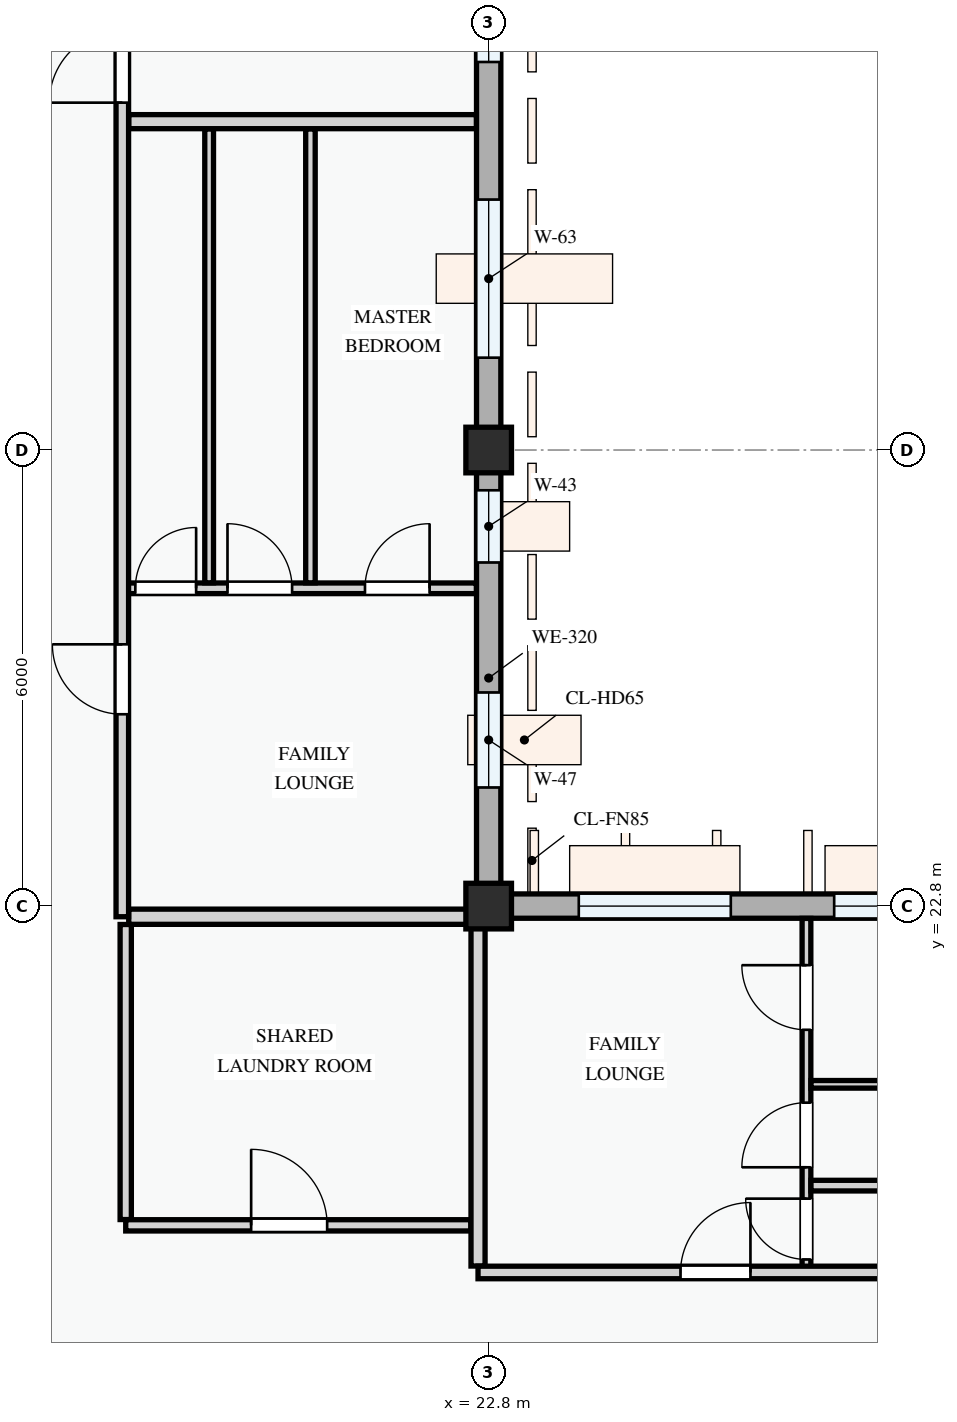
"""IFC4 building model, lengths in metres.
Left out: names, types, materials, properties, quantities, classifications, styles, units other than length and angle.
Written with IfcOpenShell. Run it as: python <this file> out.ifc"""

import sys

from ifc_helpers import new_model, si_unit, direction, frame, frame_2d, origin, origin_2d, place, context, subcontext, project, spatial, rectangle, extrude, element, fill, save


model = new_model("IFC4")
c1 = context("Model", 3, precision=1e-05, world=origin(), true_north=direction((0.0, 1.0)))
c2 = subcontext(c1, "Body", "Model", "MODEL_VIEW")
j1 = project(units=[si_unit("LENGTHUNIT", "METRE"), si_unit("PLANEANGLEUNIT", "RADIAN")], contexts=[c1])
p1 = place(None, origin())
s1 = spatial("IfcSite", under=j1, at=p1, CompositionType="ELEMENT")
p2 = place(p1, origin())
s2 = spatial("IfcBuilding", under=s1, at=p2, CompositionType="ELEMENT")
p3 = place(p2, frame((0.0, 0.0, 14.7)))
s3 = spatial("IfcBuildingStorey", under=s2, at=p3, CompositionType="ELEMENT", Elevation=14.7)
for number, where, z_axis, x_axis in (
    (1, (22.8, 22.8, 0.0), (0.0, 0.0, 1.0), (1.0, 0.0, 0.0)),
    (2, (22.8, 28.8, 0.0), (0.0, 0.0, 1.0), (1.0, 0.0, 0.0)),
):
    element("IfcColumn", number, at=place(p3, frame(where, z_axis=z_axis, x_axis=x_axis)), inside=s3, PredefinedType="COLUMN", context=c2, shape_type="SweptSolid", body=[
        extrude(rectangle(XDim=0.6, YDim=0.6, at=origin_2d()), origin(), (0.0, 0.0, 1.0), 3.3),
    ])
p4 = place(p3, frame((22.8, 22.8, 0.0), z_axis=(0.0, 0.0, 1.0), x_axis=(0.0, 1.0, 0.0)))
e3 = element("IfcWall", 3, at=p4, inside=s3, PredefinedType="STANDARD", context=c2, shape_type="SweptSolid", body=[
    extrude(rectangle(XDim=6.0, YDim=0.32, at=frame_2d((3.0, 0.0))), origin(), (0.0, 0.0, 1.0), 2.575),
])
p5 = place(p4, frame((1.56, 0.0, 0.78)))
e4 = element("IfcOpeningElement", 4, at=p5, cuts=e3, PredefinedType="OPENING", context=c2, shape_type="SweptSolid", body=[
    extrude(rectangle(XDim=1.25, YDim=1.45, at=frame_2d((0.625, 0.725))), frame((0.0, 0.17, 0.0), z_axis=(0.0, -1.0, 0.0), x_axis=(1.0, 0.0, 0.0)), (0.0, 0.0, 1.0), 0.34),
])
p6 = place(p4, frame((4.521, 0.0, 0.78)))
e5 = element("IfcOpeningElement", 5, at=p6, cuts=e3, PredefinedType="OPENING", context=c2, shape_type="SweptSolid", body=[
    extrude(rectangle(XDim=0.95, YDim=1.15, at=frame_2d((0.475, 0.575))), frame((0.0, 0.17, 0.0), z_axis=(0.0, -1.0, 0.0), x_axis=(1.0, 0.0, 0.0)), (0.0, 0.0, 1.0), 0.34),
])
p7 = place(p3, frame((22.8, 28.8, 0.0), z_axis=(0.0, 0.0, 1.0), x_axis=(0.0, 1.0, 0.0)))
e6 = element("IfcWall", 6, at=p7, inside=s3, PredefinedType="STANDARD", context=c2, shape_type="SweptSolid", body=[
    extrude(rectangle(XDim=8.4, YDim=0.32, at=frame_2d((4.2, 0.0))), origin(), (0.0, 0.0, 1.0), 2.425),
])
p8 = place(p7, frame((1.215, 0.0, 0.78)))
e7 = element("IfcOpeningElement", 7, at=p8, cuts=e6, PredefinedType="OPENING", context=c2, shape_type="SweptSolid", body=[
    extrude(rectangle(XDim=2.08, YDim=1.52, at=frame_2d((1.04, 0.76))), frame((0.0, 0.17, 0.0), z_axis=(0.0, -1.0, 0.0), x_axis=(1.0, 0.0, 0.0)), (0.0, 0.0, 1.0), 0.34),
])
p9 = place(p7, frame((5.105, 0.0, 0.78)))
e8 = element("IfcOpeningElement", 8, at=p9, cuts=e6, PredefinedType="OPENING", context=c2, shape_type="SweptSolid", body=[
    extrude(rectangle(XDim=2.32, YDim=1.5, at=frame_2d((1.16, 0.75))), frame((0.0, 0.17, 0.0), z_axis=(0.0, -1.0, 0.0), x_axis=(1.0, 0.0, 0.0)), (0.0, 0.0, 1.0), 0.34),
])
p10 = place(p3, frame((28.8, 22.8, 0.0), z_axis=(0.0, 0.0, 1.0), x_axis=(-1.0, 0.0, 0.0)))
e9 = element("IfcWall", 9, at=p10, inside=s3, PredefinedType="STANDARD", context=c2, shape_type="SweptSolid", body=[
    extrude(rectangle(XDim=6.0, YDim=0.32, at=frame_2d((3.0, 0.0))), origin(), (0.0, 0.0, 1.0), 2.475),
])
p11 = place(p10, frame((0.555, 0.0, 0.78)))
e10 = element("IfcOpeningElement", 10, at=p11, cuts=e9, PredefinedType="OPENING", context=c2, shape_type="SweptSolid", body=[
    extrude(rectangle(XDim=0.9, YDim=1.2, at=frame_2d((0.45, 0.6))), frame((0.0, 0.17, 0.0), z_axis=(0.0, -1.0, 0.0), x_axis=(1.0, 0.0, 0.0)), (0.0, 0.0, 1.0), 0.34),
])
p12 = place(p10, frame((2.815, 0.0, 0.78)))
e11 = element("IfcOpeningElement", 11, at=p12, cuts=e9, PredefinedType="OPENING", context=c2, shape_type="SweptSolid", body=[
    extrude(rectangle(XDim=2.0, YDim=1.5, at=frame_2d((1.0, 0.75))), frame((0.0, 0.17, 0.0), z_axis=(0.0, -1.0, 0.0), x_axis=(1.0, 0.0, 0.0)), (0.0, 0.0, 1.0), 0.34),
])
p13 = place(p3, frame((18.025, 18.676, 0.0), z_axis=(0.0, 0.0, 1.0), x_axis=(0.0, 1.0, 0.0)))
e12 = element("IfcWall", 12, at=p13, inside=s3, PredefinedType="PARTITIONING", context=c2, shape_type="SweptSolid", body=[
    extrude(rectangle(XDim=3.882, YDim=0.148, at=frame_2d((1.941, 0.0))), origin(), (0.0, 0.0, 1.0), 3.0),
])
p14 = place(p3, frame((18.025, 18.6, 0.0), z_axis=(0.0, 0.0, 1.0), x_axis=(1.0, 0.0, 0.0)))
e13 = element("IfcWall", 13, at=p14, inside=s3, PredefinedType="PARTITIONING", context=c2, shape_type="SweptSolid", body=[
    extrude(rectangle(XDim=4.541, YDim=0.148, at=frame_2d((2.27, 0.0))), origin(), (0.0, 0.0, 1.0), 3.0),
])
p15 = place(p14, frame((1.65, 0.0, 0.0)))
e14 = element("IfcOpeningElement", 14, at=p15, cuts=e13, PredefinedType="OPENING", context=c2, shape_type="SweptSolid", body=[
    extrude(rectangle(XDim=1.0, YDim=2.15, at=frame_2d((0.5, 1.075))), frame((0.0, 0.084, 0.0), z_axis=(0.0, -1.0, 0.0), x_axis=(1.0, 0.0, 0.0)), (0.0, 0.0, 1.0), 0.168),
])
p16 = place(p3, frame((17.98, 26.981, 0.0), z_axis=(0.0, 0.0, 1.0), x_axis=(1.0, 0.0, 0.0)))
e15 = element("IfcWall", 15, at=p16, inside=s3, PredefinedType="PARTITIONING", context=c2, shape_type="SweptSolid", body=[
    extrude(rectangle(XDim=4.658, YDim=0.14, at=frame_2d((2.329, 0.0))), origin(), (0.0, 0.0, 1.0), 3.0),
])
p17 = place(p16, frame((0.171, 0.0, 0.0)))
e16 = element("IfcOpeningElement", 16, at=p17, cuts=e15, PredefinedType="OPENING", context=c2, shape_type="SweptSolid", body=[
    extrude(rectangle(XDim=0.8, YDim=2.1, at=frame_2d((0.4, 1.05))), frame((0.0, 0.08, 0.0), z_axis=(0.0, -1.0, 0.0), x_axis=(1.0, 0.0, 0.0)), (0.0, 0.0, 1.0), 0.16),
])
p18 = place(p16, frame((1.384, 0.0, 0.0)))
e17 = element("IfcOpeningElement", 17, at=p18, cuts=e15, PredefinedType="OPENING", context=c2, shape_type="SweptSolid", body=[
    extrude(rectangle(XDim=0.85, YDim=2.1, at=frame_2d((0.425, 1.05))), frame((0.0, 0.08, 0.0), z_axis=(0.0, -1.0, 0.0), x_axis=(1.0, 0.0, 0.0)), (0.0, 0.0, 1.0), 0.16),
])
p19 = place(p16, frame((3.193, 0.0, 0.0)))
e18 = element("IfcOpeningElement", 18, at=p19, cuts=e15, PredefinedType="OPENING", context=c2, shape_type="SweptSolid", body=[
    extrude(rectangle(XDim=0.85, YDim=2.1, at=frame_2d((0.425, 1.05))), frame((0.0, 0.08, 0.0), z_axis=(0.0, -1.0, 0.0), x_axis=(1.0, 0.0, 0.0)), (0.0, 0.0, 1.0), 0.16),
])
p20 = place(p3, frame((20.455, 27.053, 0.0), z_axis=(0.0, 0.0, 1.0), x_axis=(0.0, 1.0, 0.0)))
e19 = element("IfcWall", 19, at=p20, inside=s3, PredefinedType="PARTITIONING", context=c2, shape_type="SweptSolid", body=[
    extrude(rectangle(XDim=5.973, YDim=0.125, at=frame_2d((2.986, 0.0))), origin(), (0.0, 0.0, 1.0), 3.0),
])
p21 = place(p3, frame((19.122, 27.053, 0.0), z_axis=(0.0, 0.0, 1.0), x_axis=(0.0, 1.0, 0.0)))
e20 = element("IfcWall", 20, at=p21, inside=s3, PredefinedType="PARTITIONING", context=c2, shape_type="SweptSolid", body=[
    extrude(rectangle(XDim=5.973, YDim=0.115, at=frame_2d((2.986, 0.0))), origin(), (0.0, 0.0, 1.0), 3.0),
])
p22 = place(p3, frame((18.064, 22.66, 0.0), z_axis=(0.0, 0.0, 1.0), x_axis=(1.0, 0.0, 0.0)))
e21 = element("IfcWall", 21, at=p22, inside=s3, PredefinedType="PARTITIONING", context=c2, shape_type="SweptSolid", body=[
    extrude(rectangle(XDim=4.501, YDim=0.2, at=frame_2d((2.25, 0.0))), origin(), (0.0, 0.0, 1.0), 2.375),
])
p23 = place(p3, frame((18.064, 33.12, 0.0), z_axis=(0.0, 0.0, 1.0), x_axis=(1.0, 0.0, 0.0)))
e22 = element("IfcWall", 22, at=p23, inside=s3, PredefinedType="PARTITIONING", context=c2, shape_type="SweptSolid", body=[
    extrude(rectangle(XDim=4.573, YDim=0.185, at=frame_2d((2.287, 0.0))), origin(), (0.0, 0.0, 1.0), 3.0),
])
p24 = place(p3, frame((17.98, 22.66, 0.0), z_axis=(0.0, 0.0, 1.0), x_axis=(0.0, 1.0, 0.0)))
e23 = element("IfcWall", 23, at=p24, inside=s3, PredefinedType="PARTITIONING", context=c2, shape_type="SweptSolid", body=[
    extrude(rectangle(XDim=34.778, YDim=0.165, at=frame_2d((17.389, 0.0))), origin(), (0.0, 0.0, 1.0), 3.0),
])
p25 = place(p24, frame((2.664, 0.0, 0.0)))
e24 = element("IfcOpeningElement", 24, at=p25, cuts=e23, PredefinedType="OPENING", context=c2, shape_type="SweptSolid", body=[
    extrude(rectangle(XDim=0.92, YDim=2.1, at=frame_2d((0.46, 1.05))), frame((0.0, 0.093, 0.0), z_axis=(0.0, -1.0, 0.0), x_axis=(1.0, 0.0, 0.0)), (0.0, 0.0, 1.0), 0.185),
])
p26 = place(p24, frame((10.71, 0.0, 0.0)))
e25 = element("IfcOpeningElement", 25, at=p26, cuts=e23, PredefinedType="OPENING", context=c2, shape_type="SweptSolid", body=[
    extrude(rectangle(XDim=0.96, YDim=2.12, at=frame_2d((0.48, 1.06))), frame((0.0, 0.093, 0.0), z_axis=(0.0, -1.0, 0.0), x_axis=(1.0, 0.0, 0.0)), (0.0, 0.0, 1.0), 0.185),
])
p27 = place(p24, frame((24.254, 0.0, 0.0)))
e26 = element("IfcOpeningElement", 26, at=p27, cuts=e23, PredefinedType="OPENING", context=c2, shape_type="SweptSolid", body=[
    extrude(rectangle(XDim=0.92, YDim=2.1, at=frame_2d((0.46, 1.05))), frame((0.0, 0.093, 0.0), z_axis=(0.0, -1.0, 0.0), x_axis=(1.0, 0.0, 0.0)), (0.0, 0.0, 1.0), 0.185),
])
p28 = place(p3, frame((26.981, 17.98, 0.0), z_axis=(0.0, 0.0, 1.0), x_axis=(0.0, 1.0, 0.0)))
e27 = element("IfcWall", 27, at=p28, inside=s3, PredefinedType="PARTITIONING", context=c2, shape_type="SweptSolid", body=[
    extrude(rectangle(XDim=4.658, YDim=0.115, at=frame_2d((2.329, 0.0))), origin(), (0.0, 0.0, 1.0), 3.0),
])
p29 = place(p28, frame((0.171, 0.0, 0.0)))
e28 = element("IfcOpeningElement", 28, at=p29, cuts=e27, PredefinedType="OPENING", context=c2, shape_type="SweptSolid", body=[
    extrude(rectangle(XDim=0.8, YDim=2.1, at=frame_2d((0.4, 1.05))), frame((0.0, 0.067, 0.0), z_axis=(0.0, -1.0, 0.0), x_axis=(1.0, 0.0, 0.0)), (0.0, 0.0, 1.0), 0.135),
])
p30 = place(p28, frame((1.384, 0.0, 0.0)))
e29 = element("IfcOpeningElement", 29, at=p30, cuts=e27, PredefinedType="OPENING", context=c2, shape_type="SweptSolid", body=[
    extrude(rectangle(XDim=0.85, YDim=2.1, at=frame_2d((0.425, 1.05))), frame((0.0, 0.067, 0.0), z_axis=(0.0, -1.0, 0.0), x_axis=(1.0, 0.0, 0.0)), (0.0, 0.0, 1.0), 0.135),
])
p31 = place(p28, frame((3.193, 0.0, 0.0)))
e30 = element("IfcOpeningElement", 30, at=p31, cuts=e27, PredefinedType="OPENING", context=c2, shape_type="SweptSolid", body=[
    extrude(rectangle(XDim=0.85, YDim=2.1, at=frame_2d((0.425, 1.05))), frame((0.0, 0.067, 0.0), z_axis=(0.0, -1.0, 0.0), x_axis=(1.0, 0.0, 0.0)), (0.0, 0.0, 1.0), 0.135),
])
p32 = place(p3, frame((27.04, 20.455, 0.0), z_axis=(0.0, 0.0, 1.0), x_axis=(1.0, 0.0, 0.0)))
e31 = element("IfcWall", 31, at=p32, inside=s3, PredefinedType="PARTITIONING", context=c2, shape_type="SweptSolid", body=[
    extrude(rectangle(XDim=5.968, YDim=0.1, at=frame_2d((2.984, 0.0))), origin(), (0.0, 0.0, 1.0), 3.0),
])
p33 = place(p3, frame((27.04, 19.122, 0.0), z_axis=(0.0, 0.0, 1.0), x_axis=(1.0, 0.0, 0.0)))
e32 = element("IfcWall", 32, at=p33, inside=s3, PredefinedType="PARTITIONING", context=c2, shape_type="SweptSolid", body=[
    extrude(rectangle(XDim=5.968, YDim=0.14, at=frame_2d((2.984, 0.0))), origin(), (0.0, 0.0, 1.0), 3.0),
])
p34 = place(p3, frame((22.66, 18.064, 0.0), z_axis=(0.0, 0.0, 1.0), x_axis=(0.0, 1.0, 0.0)))
e33 = element("IfcWall", 33, at=p34, inside=s3, PredefinedType="PARTITIONING", context=c2, shape_type="SweptSolid", body=[
    extrude(rectangle(XDim=4.676, YDim=0.185, at=frame_2d((2.338, 0.0))), origin(), (0.0, 0.0, 1.0), 2.425),
])
p35 = place(p3, frame((22.66, 17.98, 0.0), z_axis=(0.0, 0.0, 1.0), x_axis=(1.0, 0.0, 0.0)))
e34 = element("IfcWall", 34, at=p35, inside=s3, PredefinedType="PARTITIONING", context=c2, shape_type="SweptSolid", body=[
    extrude(rectangle(XDim=34.778, YDim=0.165, at=frame_2d((17.389, 0.0))), origin(), (0.0, 0.0, 1.0), 3.0),
])
p36 = place(p35, frame((2.664, 0.0, 0.0)))
e35 = element("IfcOpeningElement", 35, at=p36, cuts=e34, PredefinedType="OPENING", context=c2, shape_type="SweptSolid", body=[
    extrude(rectangle(XDim=0.92, YDim=2.1, at=frame_2d((0.46, 1.05))), frame((0.0, 0.093, 0.0), z_axis=(0.0, -1.0, 0.0), x_axis=(1.0, 0.0, 0.0)), (0.0, 0.0, 1.0), 0.185),
])
p37 = place(p35, frame((10.71, 0.0, 0.0)))
e36 = element("IfcOpeningElement", 36, at=p37, cuts=e34, PredefinedType="OPENING", context=c2, shape_type="SweptSolid", body=[
    extrude(rectangle(XDim=0.92, YDim=2.1, at=frame_2d((0.46, 1.05))), frame((0.0, 0.093, 0.0), z_axis=(0.0, -1.0, 0.0), x_axis=(1.0, 0.0, 0.0)), (0.0, 0.0, 1.0), 0.185),
])
p38 = place(p35, frame((24.254, 0.0, 0.0)))
e37 = element("IfcOpeningElement", 37, at=p38, cuts=e34, PredefinedType="OPENING", context=c2, shape_type="SweptSolid", body=[
    extrude(rectangle(XDim=0.96, YDim=2.12, at=frame_2d((0.48, 1.06))), frame((0.0, 0.093, 0.0), z_axis=(0.0, -1.0, 0.0), x_axis=(1.0, 0.0, 0.0)), (0.0, 0.0, 1.0), 0.185),
])
p39 = place(p5, origin())
e38 = element("IfcWindow", 38, at=p39, inside=s3, PartitioningType="SINGLE_PANEL", PredefinedType="WINDOW", context=c2, shape_type="SweptSolid", body=[
    extrude(rectangle(XDim=1.25, YDim=1.45, at=frame_2d((0.625, 0.725))), frame((0.0, 0.03, 0.0), z_axis=(0.0, -1.0, 0.0), x_axis=(1.0, 0.0, 0.0)), (0.0, 0.0, 1.0), 0.06),
])
fill(e4, e38)
p40 = place(p6, origin())
e39 = element("IfcWindow", 39, at=p40, inside=s3, PartitioningType="SINGLE_PANEL", PredefinedType="WINDOW", context=c2, shape_type="SweptSolid", body=[
    extrude(rectangle(XDim=0.95, YDim=1.15, at=frame_2d((0.475, 0.575))), frame((0.0, 0.03, 0.0), z_axis=(0.0, -1.0, 0.0), x_axis=(1.0, 0.0, 0.0)), (0.0, 0.0, 1.0), 0.06),
])
fill(e5, e39)
p41 = place(p8, origin())
e40 = element("IfcWindow", 40, at=p41, inside=s3, PartitioningType="DOUBLE_PANEL_VERTICAL", PredefinedType="WINDOW", context=c2, shape_type="SweptSolid", body=[
    extrude(rectangle(XDim=2.08, YDim=1.52, at=frame_2d((1.04, 0.76))), frame((0.0, 0.03, 0.0), z_axis=(0.0, -1.0, 0.0), x_axis=(1.0, 0.0, 0.0)), (0.0, 0.0, 1.0), 0.06),
])
fill(e7, e40)
p42 = place(p9, origin())
e41 = element("IfcWindow", 41, at=p42, inside=s3, PartitioningType="DOUBLE_PANEL_VERTICAL", PredefinedType="WINDOW", context=c2, shape_type="SweptSolid", body=[
    extrude(rectangle(XDim=2.32, YDim=1.5, at=frame_2d((1.16, 0.75))), frame((0.0, 0.03, 0.0), z_axis=(0.0, -1.0, 0.0), x_axis=(1.0, 0.0, 0.0)), (0.0, 0.0, 1.0), 0.06),
])
fill(e8, e41)
p43 = place(p11, origin())
e42 = element("IfcWindow", 42, at=p43, inside=s3, PartitioningType="SINGLE_PANEL", PredefinedType="WINDOW", context=c2, shape_type="SweptSolid", body=[
    extrude(rectangle(XDim=0.9, YDim=1.2, at=frame_2d((0.45, 0.6))), frame((0.0, 0.03, 0.0), z_axis=(0.0, -1.0, 0.0), x_axis=(1.0, 0.0, 0.0)), (0.0, 0.0, 1.0), 0.06),
])
fill(e10, e42)
p44 = place(p12, origin())
e43 = element("IfcWindow", 43, at=p44, inside=s3, PartitioningType="DOUBLE_PANEL_VERTICAL", PredefinedType="WINDOW", context=c2, shape_type="SweptSolid", body=[
    extrude(rectangle(XDim=2.0, YDim=1.5, at=frame_2d((1.0, 0.75))), frame((0.0, 0.03, 0.0), z_axis=(0.0, -1.0, 0.0), x_axis=(1.0, 0.0, 0.0)), (0.0, 0.0, 1.0), 0.06),
])
fill(e11, e43)
p45 = place(p15, origin())
e44 = element("IfcDoor", 44, at=p45, inside=s3, OperationType="SINGLE_SWING_LEFT", PredefinedType="DOOR", context=c2, shape_type="SweptSolid", body=[
    extrude(rectangle(XDim=1.0, YDim=2.15, at=frame_2d((0.5, 1.075))), frame((0.0, 0.025, 0.0), z_axis=(0.0, -1.0, 0.0), x_axis=(1.0, 0.0, 0.0)), (0.0, 0.0, 1.0), 0.05),
])
fill(e14, e44)
p46 = place(p17, origin())
e45 = element("IfcDoor", 45, at=p46, inside=s3, OperationType="SINGLE_SWING_RIGHT", PredefinedType="DOOR", context=c2, shape_type="SweptSolid", body=[
    extrude(rectangle(XDim=0.8, YDim=2.1, at=frame_2d((0.4, 1.05))), frame((0.0, 0.025, 0.0), z_axis=(0.0, -1.0, 0.0), x_axis=(1.0, 0.0, 0.0)), (0.0, 0.0, 1.0), 0.05),
])
fill(e16, e45)
p47 = place(p18, origin())
e46 = element("IfcDoor", 46, at=p47, inside=s3, OperationType="SINGLE_SWING_LEFT", PredefinedType="DOOR", context=c2, shape_type="SweptSolid", body=[
    extrude(rectangle(XDim=0.85, YDim=2.1, at=frame_2d((0.425, 1.05))), frame((0.0, 0.025, 0.0), z_axis=(0.0, -1.0, 0.0), x_axis=(1.0, 0.0, 0.0)), (0.0, 0.0, 1.0), 0.05),
])
fill(e17, e46)
p48 = place(p19, origin())
e47 = element("IfcDoor", 47, at=p48, inside=s3, OperationType="SINGLE_SWING_RIGHT", PredefinedType="DOOR", context=c2, shape_type="SweptSolid", body=[
    extrude(rectangle(XDim=0.85, YDim=2.1, at=frame_2d((0.425, 1.05))), frame((0.0, 0.025, 0.0), z_axis=(0.0, -1.0, 0.0), x_axis=(1.0, 0.0, 0.0)), (0.0, 0.0, 1.0), 0.05),
])
fill(e18, e47)
p49 = place(p25, origin())
e48 = element("IfcDoor", 48, at=p49, inside=s3, OperationType="SINGLE_SWING_RIGHT", PredefinedType="DOOR", context=c2, shape_type="SweptSolid", body=[
    extrude(rectangle(XDim=0.92, YDim=2.1, at=frame_2d((0.46, 1.05))), frame((0.0, 0.025, 0.0), z_axis=(0.0, -1.0, 0.0), x_axis=(1.0, 0.0, 0.0)), (0.0, 0.0, 1.0), 0.05),
])
fill(e24, e48)
p50 = place(p26, origin())
e49 = element("IfcDoor", 49, at=p50, inside=s3, OperationType="SINGLE_SWING_LEFT", PredefinedType="DOOR", context=c2, shape_type="SweptSolid", body=[
    extrude(rectangle(XDim=0.96, YDim=2.12, at=frame_2d((0.48, 1.06))), frame((0.0, 0.025, 0.0), z_axis=(0.0, -1.0, 0.0), x_axis=(1.0, 0.0, 0.0)), (0.0, 0.0, 1.0), 0.05),
])
fill(e25, e49)
p51 = place(p29, origin())
e50 = element("IfcDoor", 50, at=p51, inside=s3, OperationType="SINGLE_SWING_RIGHT", PredefinedType="DOOR", context=c2, shape_type="SweptSolid", body=[
    extrude(rectangle(XDim=0.8, YDim=2.1, at=frame_2d((0.4, 1.05))), frame((0.0, 0.025, 0.0), z_axis=(0.0, -1.0, 0.0), x_axis=(1.0, 0.0, 0.0)), (0.0, 0.0, 1.0), 0.05),
])
fill(e28, e50)
p52 = place(p30, origin())
e51 = element("IfcDoor", 51, at=p52, inside=s3, OperationType="SINGLE_SWING_LEFT", PredefinedType="DOOR", context=c2, shape_type="SweptSolid", body=[
    extrude(rectangle(XDim=0.85, YDim=2.1, at=frame_2d((0.425, 1.05))), frame((0.0, 0.025, 0.0), z_axis=(0.0, -1.0, 0.0), x_axis=(1.0, 0.0, 0.0)), (0.0, 0.0, 1.0), 0.05),
])
fill(e29, e51)
p53 = place(p31, origin())
e52 = element("IfcDoor", 52, at=p53, inside=s3, OperationType="SINGLE_SWING_RIGHT", PredefinedType="DOOR", context=c2, shape_type="SweptSolid", body=[
    extrude(rectangle(XDim=0.85, YDim=2.1, at=frame_2d((0.425, 1.05))), frame((0.0, 0.025, 0.0), z_axis=(0.0, -1.0, 0.0), x_axis=(1.0, 0.0, 0.0)), (0.0, 0.0, 1.0), 0.05),
])
fill(e30, e52)
p54 = place(p36, origin())
e53 = element("IfcDoor", 53, at=p54, inside=s3, OperationType="SINGLE_SWING_RIGHT", PredefinedType="DOOR", context=c2, shape_type="SweptSolid", body=[
    extrude(rectangle(XDim=0.92, YDim=2.1, at=frame_2d((0.46, 1.05))), frame((0.0, 0.025, 0.0), z_axis=(0.0, -1.0, 0.0), x_axis=(1.0, 0.0, 0.0)), (0.0, 0.0, 1.0), 0.05),
])
fill(e35, e53)
save(model, sys.argv[1])
